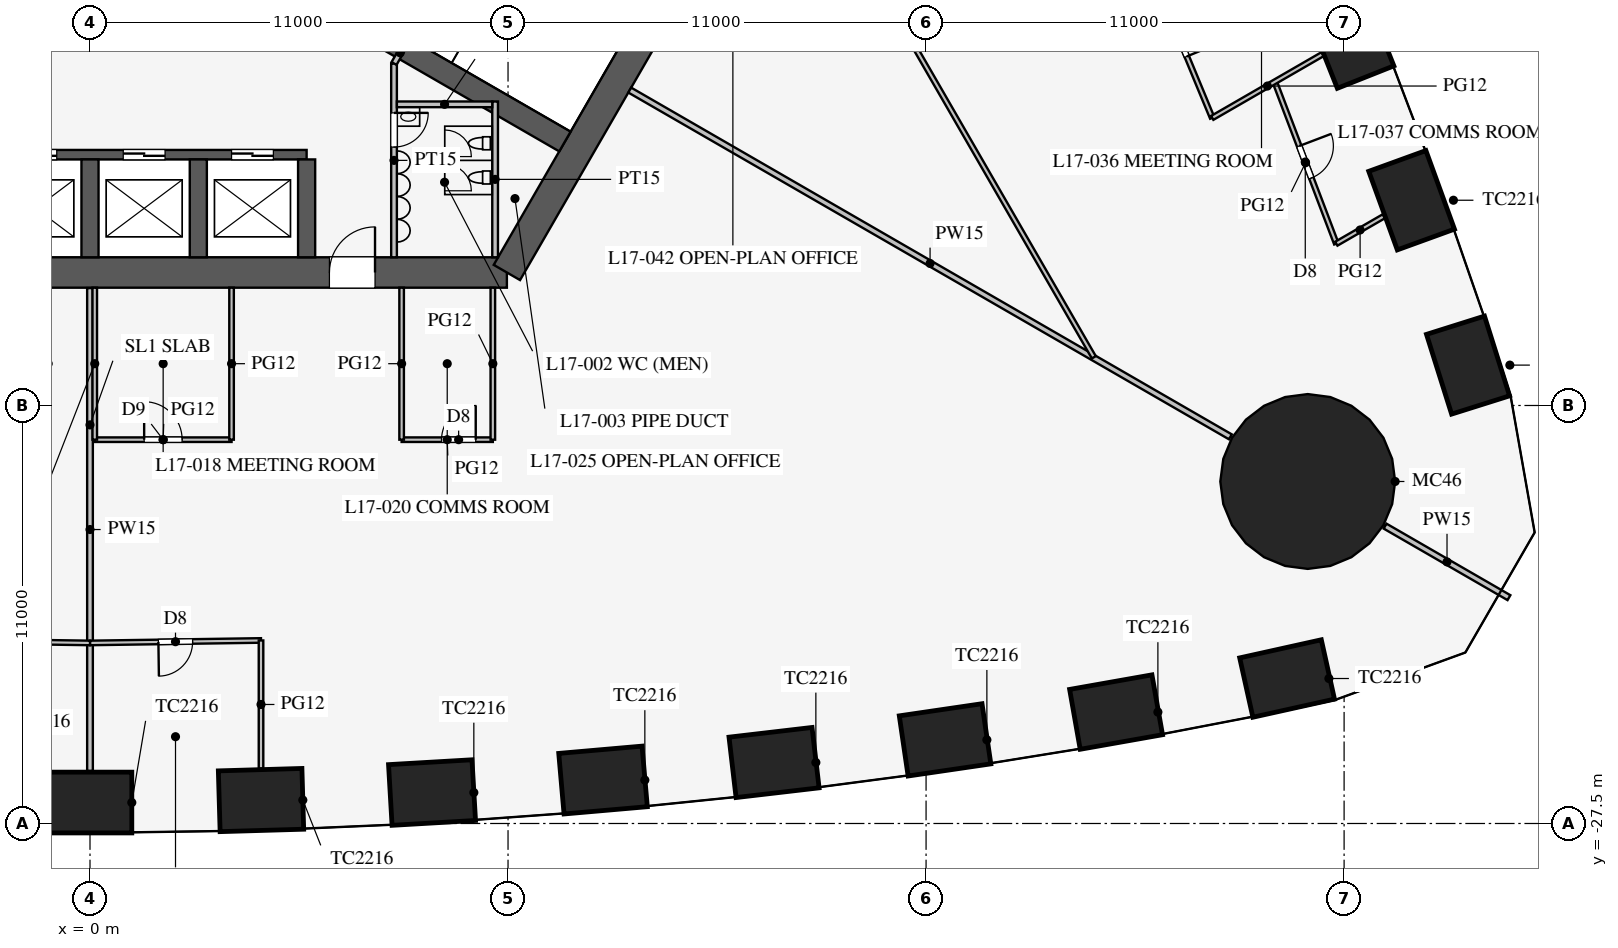
"""IFC4 building model, lengths in metres.
Left out: names, types, materials, properties, quantities, classifications, styles, units other than length and angle.
Written with IfcOpenShell. Run it as: python <this file> out.ifc"""

import sys

from ifc_helpers import new_model, si_unit, direction, frame, frame_2d, origin, origin_2d, place, context, subcontext, project, spatial, rectangle, circle, extrude, element, fill, save


model = new_model("IFC4")
c1 = context("Model", 3, precision=1e-05, world=origin(), true_north=direction((0.0, 1.0)))
c2 = subcontext(c1, "Body", "Model", "MODEL_VIEW")
j1 = project(units=[si_unit("LENGTHUNIT", "METRE"), si_unit("PLANEANGLEUNIT", "RADIAN")], contexts=[c1])
p1 = place(None, origin())
s1 = spatial("IfcSite", under=j1, at=p1, CompositionType="ELEMENT")
p2 = place(p1, origin())
s2 = spatial("IfcBuilding", under=s1, at=p2, CompositionType="ELEMENT")
p3 = place(p2, frame((0.0, 0.0, 75.3)))
s3 = spatial("IfcBuildingStorey", under=s2, at=p3, CompositionType="ELEMENT", Elevation=75.3)
for number, where, z_axis, x_axis in (
    (1, (0.0, -26.949, 0.0), (0.0, 0.0, 1.0), (1.0, 0.0, 0.0)),
    (2, (4.5, -26.883, 0.0), (0.0, 0.0, 1.0), (1.0, 0.029, 0.0)),
    (3, (9.0, -26.686, 0.0), (0.0, 0.0, 1.0), (0.998, 0.058, 0.0)),
    (4, (13.5, -26.357, 0.0), (0.0, 0.0, 1.0), (0.996, 0.087, 0.0)),
    (5, (18.0, -25.895, 0.0), (0.0, 0.0, 1.0), (0.993, 0.116, 0.0)),
    (6, (22.5, -25.299, 0.0), (0.0, 0.0, 1.0), (0.989, 0.145, 0.0)),
    (7, (27.0, -24.568, 0.0), (0.0, 0.0, 1.0), (0.985, 0.174, 0.0)),
    (8, (31.5, -23.685, 0.0), (0.0, 0.0, 1.0), (0.976, 0.217, 0.0)),
    (9, (36.262, -15.438, 0.0), (0.0, 0.0, 1.0), (-0.3, 0.954, 0.0)),
    (10, (34.776, -11.099, 0.0), (0.0, 0.0, 1.0), (-0.342, 0.94, 0.0)),
    (11, (33.16, -6.836, 0.0), (0.0, 0.0, 1.0), (-0.369, 0.929, 0.0)),
):
    element("IfcColumn", number, at=place(p3, frame(where, z_axis=z_axis, x_axis=x_axis)), inside=s3, PredefinedType="COLUMN", context=c2, shape_type="SweptSolid", body=[
        extrude(rectangle(XDim=2.2, YDim=1.6, at=origin_2d()), origin(), (0.0, 0.0, 1.0), 4.2),
    ])
p4 = place(p3, frame((32.043, -18.5, 0.0), z_axis=(0.0, 0.0, 1.0), x_axis=(1.0, 0.0, 0.0)))
e12 = element("IfcColumn", 12, at=p4, inside=s3, PredefinedType="COLUMN", context=c2, shape_type="SweptSolid", body=[
    extrude(circle(Radius=2.3, at=origin_2d()), origin(), (0.0, 0.0, 1.0), 4.2),
])
p5 = place(p3, frame((-10.97, -13.0, 0.0), z_axis=(0.0, 0.0, 1.0), x_axis=(1.0, 0.0, 0.0)))
e13 = element("IfcWall", 13, at=p5, inside=s3, PredefinedType="SHEAR", context=c2, shape_type="SweptSolid", body=[
    extrude(rectangle(XDim=21.939, YDim=0.8, at=frame_2d((10.97, 0.0))), origin(), (0.0, 0.0, 1.0), 4.2),
])
p6 = place(p5, frame((17.27, 0.0, 0.0)))
e14 = element("IfcOpeningElement", 14, at=p6, cuts=e13, PredefinedType="OPENING", context=c2, shape_type="SweptSolid", body=[
    extrude(rectangle(XDim=1.2, YDim=2.1, at=frame_2d((0.6, 1.05))), frame((0.0, 0.41, 0.0), z_axis=(0.0, -1.0, 0.0), x_axis=(1.0, 0.0, 0.0)), (0.0, 0.0, 1.0), 0.82),
])
p7 = place(p5, frame((3.47, 0.0, 0.0)))
e15 = element("IfcOpeningElement", 15, at=p7, cuts=e13, PredefinedType="OPENING", context=c2, shape_type="SweptSolid", body=[
    extrude(rectangle(XDim=1.2, YDim=2.1, at=frame_2d((0.6, 1.05))), frame((0.0, 0.41, 0.0), z_axis=(0.0, -1.0, 0.0), x_axis=(1.0, 0.0, 0.0)), (0.0, 0.0, 1.0), 0.82),
])
p8 = place(p3, frame((10.97, -13.0, 0.0), z_axis=(0.0, 0.0, 1.0), x_axis=(0.499995765644, 0.866027848477, 0.0)))
e16 = element("IfcWall", 16, at=p8, inside=s3, PredefinedType="SHEAR", context=c2, shape_type="SweptSolid", body=[
    extrude(rectangle(XDim=11.547, YDim=0.8, at=frame_2d((5.773, 0.0))), origin(), (0.0, 0.0, 1.0), 4.2),
])
p9 = place(p3, frame((-5.7, -9.9, 0.0), z_axis=(0.0, 0.0, 1.0), x_axis=(1.0, 0.0, 0.0)))
e17 = element("IfcWall", 17, at=p9, inside=s3, PredefinedType="SHEAR", context=c2, shape_type="SweptSolid", body=[
    extrude(rectangle(XDim=11.4, YDim=0.25, at=frame_2d((5.7, 0.0))), origin(), (0.0, 0.0, 1.0), 4.2),
])
p10 = place(p9, frame((0.875, 0.0, 0.0)))
e18 = element("IfcOpeningElement", 18, at=p10, cuts=e17, PredefinedType="OPENING", context=c2, shape_type="SweptSolid", body=[
    extrude(rectangle(XDim=1.1, YDim=2.2, at=frame_2d((0.55, 1.1))), frame((0.0, 0.135, 0.0), z_axis=(0.0, -1.0, 0.0), x_axis=(1.0, 0.0, 0.0)), (0.0, 0.0, 1.0), 0.27),
])
p11 = place(p9, frame((3.725, 0.0, 0.0)))
e19 = element("IfcOpeningElement", 19, at=p11, cuts=e17, PredefinedType="OPENING", context=c2, shape_type="SweptSolid", body=[
    extrude(rectangle(XDim=1.1, YDim=2.2, at=frame_2d((0.55, 1.1))), frame((0.0, 0.135, 0.0), z_axis=(0.0, -1.0, 0.0), x_axis=(1.0, 0.0, 0.0)), (0.0, 0.0, 1.0), 0.27),
])
p12 = place(p9, frame((6.575, 0.0, 0.0)))
e20 = element("IfcOpeningElement", 20, at=p12, cuts=e17, PredefinedType="OPENING", context=c2, shape_type="SweptSolid", body=[
    extrude(rectangle(XDim=1.1, YDim=2.2, at=frame_2d((0.55, 1.1))), frame((0.0, 0.135, 0.0), z_axis=(0.0, -1.0, 0.0), x_axis=(1.0, 0.0, 0.0)), (0.0, 0.0, 1.0), 0.27),
])
p13 = place(p9, frame((9.425, 0.0, 0.0)))
e21 = element("IfcOpeningElement", 21, at=p13, cuts=e17, PredefinedType="OPENING", context=c2, shape_type="SweptSolid", body=[
    extrude(rectangle(XDim=1.1, YDim=2.2, at=frame_2d((0.55, 1.1))), frame((0.0, 0.135, 0.0), z_axis=(0.0, -1.0, 0.0), x_axis=(1.0, 0.0, 0.0)), (0.0, 0.0, 1.0), 0.27),
])
for number, where, z_axis, x_axis in (
    (22, (0.0, -10.025, 0.0), (0.0, 0.0, 1.0), (0.0, -1.0, 0.0)),
    (23, (2.85, -10.025, 0.0), (0.0, 0.0, 1.0), (0.0, -1.0, 0.0)),
    (24, (5.7, -10.025, 0.0), (0.0, 0.0, 1.0), (0.0, -1.0, 0.0)),
):
    element("IfcWall", number, at=place(p3, frame(where, z_axis=z_axis, x_axis=x_axis)), inside=s3, PredefinedType="SHEAR", context=c2, shape_type="SweptSolid", body=[
        extrude(rectangle(XDim=2.575, YDim=0.45, at=frame_2d((1.288, 0.0))), origin(), (0.0, 0.0, 1.0), 4.2),
    ])
p14 = place(p3, frame((4.638, -5.016, 0.0), z_axis=(0.0, 0.0, 1.0), x_axis=(0.866019375473, -0.500010441196, 0.0)))
e25 = element("IfcWall", 25, at=p14, inside=s3, PredefinedType="SHEAR", context=c2, shape_type="SweptSolid", body=[
    extrude(rectangle(XDim=9.075, YDim=0.6, at=frame_2d((4.538, 0.0))), origin(), (0.0, 0.0, 1.0), 4.2),
])
p15 = place(p3, frame((8.0, -7.5, 0.0), z_axis=(0.0, 0.0, 1.0), x_axis=(0.0, -1.0, 0.0)))
e26 = element("IfcWall", 26, at=p15, inside=s3, PredefinedType="PARTITIONING", context=c2, shape_type="SweptSolid", body=[
    extrude(rectangle(XDim=5.1, YDim=0.15, at=frame_2d((2.55, 0.0))), origin(), (0.0, 0.0, 1.0), 4.0),
])
p16 = place(p15, frame((1.3, 0.0, 0.0)))
e27 = element("IfcOpeningElement", 27, at=p16, cuts=e26, PredefinedType="OPENING", context=c2, shape_type="SweptSolid", body=[
    extrude(rectangle(XDim=0.9, YDim=2.1, at=frame_2d((0.45, 1.05))), frame((0.0, 0.085, 0.0), z_axis=(0.0, -1.0, 0.0), x_axis=(1.0, 0.0, 0.0)), (0.0, 0.0, 1.0), 0.17),
])
p17 = place(p3, frame((8.0, -7.5, 0.0), z_axis=(0.0, 0.0, 1.0), x_axis=(0.499842556608, 0.866116284689, 0.0)))
e28 = element("IfcWall", 28, at=p17, inside=s3, PredefinedType="PARTITIONING", context=c2, shape_type="SweptSolid", body=[
    extrude(rectangle(XDim=0.645, YDim=0.15, at=frame_2d((0.323, 0.0))), origin(), (0.0, 0.0, 1.0), 4.0),
])
p18 = place(p3, frame((10.66, -8.5, 0.0), z_axis=(0.0, 0.0, 1.0), x_axis=(0.0, -1.0, 0.0)))
e29 = element("IfcWall", 29, at=p18, inside=s3, PredefinedType="PARTITIONING", context=c2, shape_type="SweptSolid", body=[
    extrude(rectangle(XDim=4.1, YDim=0.15, at=frame_2d((2.05, 0.0))), origin(), (0.0, 0.0, 1.0), 4.0),
])
p19 = place(p3, frame((8.075, -8.575, 0.0), z_axis=(0.0, 0.0, 1.0), x_axis=(1.0, 0.0, 0.0)))
e30 = element("IfcWall", 30, at=p19, inside=s3, PredefinedType="PARTITIONING", context=c2, shape_type="SweptSolid", body=[
    extrude(rectangle(XDim=2.51, YDim=0.15, at=frame_2d((1.255, 0.0))), origin(), (0.0, 0.0, 1.0), 4.0),
])
p20 = place(p3, frame((14.203, -8.2, 0.0), z_axis=(0.0, 0.0, 1.0), x_axis=(0.866024965723, -0.500000758745, 0.0)))
e31 = element("IfcWall", 31, at=p20, inside=s3, PredefinedType="PARTITIONING", context=c2, shape_type="SweptSolid", body=[
    extrude(rectangle(XDim=18.25, YDim=0.15, at=frame_2d((9.125, 0.0))), origin(), (0.0, 0.0, 1.0), 2.3),
])
p21 = place(p3, frame((34.078, -19.675, 0.0), z_axis=(0.0, 0.0, 1.0), x_axis=(0.866019247219, -0.500010663332, 0.0)))
e32 = element("IfcWall", 32, at=p21, inside=s3, PredefinedType="PARTITIONING", context=c2, shape_type="SweptSolid", body=[
    extrude(rectangle(XDim=3.764, YDim=0.15, at=frame_2d((1.882, 0.0))), origin(), (0.0, 0.0, 1.0), 2.3),
])
p22 = place(p3, frame((0.0, -13.41, 0.0), z_axis=(0.0, 0.0, 1.0), x_axis=(0.0, -1.0, 0.0)))
e33 = element("IfcWall", 33, at=p22, inside=s3, PredefinedType="PARTITIONING", context=c2, shape_type="SweptSolid", body=[
    extrude(rectangle(XDim=12.709, YDim=0.15, at=frame_2d((6.354, 0.0))), origin(), (0.0, 0.0, 1.0), 2.8),
])
p23 = place(p3, frame((0.125, -17.4, 0.0), z_axis=(0.0, 0.0, 1.0), x_axis=(1.0, 0.0, 0.0)))
e34 = element("IfcWall", 34, at=p23, inside=s3, PredefinedType="PARTITIONING", context=c2, shape_type="SweptSolid", body=[
    extrude(rectangle(XDim=3.6, YDim=0.12, at=frame_2d((1.8, 0.0))), origin(), (0.0, 0.0, 1.0), 2.9),
])
p24 = place(p23, frame((1.3, 0.0, 0.15)))
e35 = element("IfcOpeningElement", 35, at=p24, cuts=e34, PredefinedType="OPENING", context=c2, shape_type="SweptSolid", body=[
    extrude(rectangle(XDim=1.0, YDim=2.1, at=frame_2d((0.5, 1.05))), frame((0.0, 0.07, 0.0), z_axis=(0.0, -1.0, 0.0), x_axis=(1.0, 0.0, 0.0)), (0.0, 0.0, 1.0), 0.14),
])
p25 = place(p3, frame((8.2, -17.4, 0.0), z_axis=(0.0, 0.0, 1.0), x_axis=(1.0, 0.0, 0.0)))
e36 = element("IfcWall", 36, at=p25, inside=s3, PredefinedType="PARTITIONING", context=c2, shape_type="SweptSolid", body=[
    extrude(rectangle(XDim=2.4, YDim=0.12, at=frame_2d((1.2, 0.0))), origin(), (0.0, 0.0, 1.0), 2.9),
])
p26 = place(p25, frame((1.05, 0.0, 0.15)))
e37 = element("IfcOpeningElement", 37, at=p26, cuts=e36, PredefinedType="OPENING", context=c2, shape_type="SweptSolid", body=[
    extrude(rectangle(XDim=0.9, YDim=2.1, at=frame_2d((0.45, 1.05))), frame((0.0, 0.07, 0.0), z_axis=(0.0, -1.0, 0.0), x_axis=(1.0, 0.0, 0.0)), (0.0, 0.0, 1.0), 0.14),
])
p27 = place(p3, frame((0.125, -13.4, 0.0), z_axis=(0.0, 0.0, 1.0), x_axis=(0.0, -1.0, 0.0)))
e38 = element("IfcWall", 38, at=p27, inside=s3, PredefinedType="PARTITIONING", context=c2, shape_type="SweptSolid", body=[
    extrude(rectangle(XDim=4.0, YDim=0.12, at=frame_2d((2.0, 0.0))), origin(), (0.0, 0.0, 1.0), 2.8),
])
for number, where, z_axis, x_axis in (
    (39, (10.6, -13.4, 0.0), (0.0, 0.0, 1.0), (0.0, -1.0, 0.0)),
    (40, (3.725, -13.4, 0.0), (0.0, 0.0, 1.0), (0.0, -1.0, 0.0)),
    (41, (8.2, -13.4, 0.0), (0.0, 0.0, 1.0), (0.0, -1.0, 0.0)),
):
    element("IfcWall", number, at=place(p3, frame(where, z_axis=z_axis, x_axis=x_axis)), inside=s3, PredefinedType="PARTITIONING", context=c2, shape_type="SweptSolid", body=[
        extrude(rectangle(XDim=4.0, YDim=0.12, at=frame_2d((2.0, 0.0))), origin(), (0.0, 0.0, 1.0), 2.9),
    ])
p28 = place(p3, frame((0.0, -22.749, 0.0), z_axis=(0.0, 0.0, 1.0), x_axis=(0.999894311967, 0.014538393859, 0.0)))
e42 = element("IfcWall", 42, at=p28, inside=s3, PredefinedType="PARTITIONING", context=c2, shape_type="SweptSolid", body=[
    extrude(rectangle(XDim=4.5, YDim=0.12, at=frame_2d((2.25, 0.0))), origin(), (0.0, 0.0, 1.0), 2.9),
])
p29 = place(p28, frame((1.8, 0.0, 0.15)))
e43 = element("IfcOpeningElement", 43, at=p29, cuts=e42, PredefinedType="OPENING", context=c2, shape_type="SweptSolid", body=[
    extrude(rectangle(XDim=0.9, YDim=2.1, at=frame_2d((0.45, 1.05))), frame((0.0, 0.07, 0.0), z_axis=(0.0, -1.0, 0.0), x_axis=(1.0, 0.0, 0.0)), (0.0, 0.0, 1.0), 0.14),
])
p30 = place(p3, frame((-4.5, -22.683, 0.0), z_axis=(0.0, 0.0, 1.0), x_axis=(0.999894311967, -0.014538393859, 0.0)))
e44 = element("IfcWall", 44, at=p30, inside=s3, PredefinedType="PARTITIONING", context=c2, shape_type="SweptSolid", body=[
    extrude(rectangle(XDim=4.5, YDim=0.12, at=frame_2d((2.25, 0.0))), origin(), (0.0, 0.0, 1.0), 2.9),
])
p31 = place(p30, frame((1.8, 0.0, 0.15)))
e45 = element("IfcOpeningElement", 45, at=p31, cuts=e44, PredefinedType="OPENING", context=c2, shape_type="SweptSolid", body=[
    extrude(rectangle(XDim=0.9, YDim=2.1, at=frame_2d((0.45, 1.05))), frame((0.0, 0.07, 0.0), z_axis=(0.0, -1.0, 0.0), x_axis=(1.0, 0.0, 0.0)), (0.0, 0.0, 1.0), 0.14),
])
p32 = place(p3, frame((4.5, -22.683, 0.0), z_axis=(0.0, 0.0, 1.0), x_axis=(0.0, -1.0, 0.0)))
e46 = element("IfcWall", 46, at=p32, inside=s3, PredefinedType="PARTITIONING", context=c2, shape_type="SweptSolid", body=[
    extrude(rectangle(XDim=3.369, YDim=0.12, at=frame_2d((1.685, 0.0))), origin(), (0.0, 0.0, 1.0), 2.8),
])
p33 = place(p3, frame((26.415, -15.231, 0.0), z_axis=(0.0, 0.0, 1.0), x_axis=(-0.50000091641, 0.866024874695, 0.0)))
e47 = element("IfcWall", 47, at=p33, inside=s3, PredefinedType="PARTITIONING", context=c2, shape_type="SweptSolid", body=[
    extrude(rectangle(XDim=52.796, YDim=0.12, at=frame_2d((26.398, 0.0))), origin(), (0.0, 0.0, 1.0), 2.9),
])
p34 = place(p33, frame((10.2, 0.0, 0.15)))
e48 = element("IfcOpeningElement", 48, at=p34, cuts=e47, PredefinedType="OPENING", context=c2, shape_type="SweptSolid", body=[
    extrude(rectangle(XDim=1.8, YDim=2.1, at=frame_2d((0.9, 1.05))), frame((0.0, 0.07, 0.0), z_axis=(0.0, -1.0, 0.0), x_axis=(1.0, 0.0, 0.0)), (0.0, 0.0, 1.0), 0.14),
])
p35 = place(p33, frame((40.8, 0.0, 0.15)))
e49 = element("IfcOpeningElement", 49, at=p35, cuts=e47, PredefinedType="OPENING", context=c2, shape_type="SweptSolid", body=[
    extrude(rectangle(XDim=1.8, YDim=2.1, at=frame_2d((0.9, 1.05))), frame((0.0, 0.07, 0.0), z_axis=(0.0, -1.0, 0.0), x_axis=(1.0, 0.0, 0.0)), (0.0, 0.0, 1.0), 0.14),
])
p36 = place(p3, frame((29.53, -8.932, 0.0), z_axis=(0.0, 0.0, 1.0), x_axis=(-0.382639984525, 0.923897527999, 0.0)))
e50 = element("IfcWall", 50, at=p36, inside=s3, PredefinedType="PARTITIONING", context=c2, shape_type="SweptSolid", body=[
    extrude(rectangle(XDim=4.539, YDim=0.12, at=frame_2d((2.27, 0.0))), origin(), (0.0, 0.0, 1.0), 2.9),
])
p37 = place(p36, frame((1.75, 0.0, 0.15)))
e51 = element("IfcOpeningElement", 51, at=p37, cuts=e50, PredefinedType="OPENING", context=c2, shape_type="SweptSolid", body=[
    extrude(rectangle(XDim=1.0, YDim=2.1, at=frame_2d((0.5, 1.05))), frame((0.0, 0.07, 0.0), z_axis=(0.0, -1.0, 0.0), x_axis=(1.0, 0.0, 0.0)), (0.0, 0.0, 1.0), 0.14),
])
p38 = place(p3, frame((32.795, -12.242, 0.0), z_axis=(0.0, 0.0, 1.0), x_axis=(-0.355369393324, 0.934725946087, 0.0)))
e52 = element("IfcWall", 52, at=p38, inside=s3, PredefinedType="PARTITIONING", context=c2, shape_type="SweptSolid", body=[
    extrude(rectangle(XDim=4.558, YDim=0.12, at=frame_2d((2.279, 0.0))), origin(), (0.0, 0.0, 1.0), 2.9),
])
p39 = place(p38, frame((1.85, 0.0, 0.15)))
e53 = element("IfcOpeningElement", 53, at=p39, cuts=e52, PredefinedType="OPENING", context=c2, shape_type="SweptSolid", body=[
    extrude(rectangle(XDim=0.9, YDim=2.1, at=frame_2d((0.45, 1.05))), frame((0.0, 0.07, 0.0), z_axis=(0.0, -1.0, 0.0), x_axis=(1.0, 0.0, 0.0)), (0.0, 0.0, 1.0), 0.14),
])
p40 = place(p3, frame((29.53, -8.932, 0.0), z_axis=(0.0, 0.0, 1.0), x_axis=(0.866038859646, 0.49997669304, 0.0)))
e54 = element("IfcWall", 54, at=p40, inside=s3, PredefinedType="PARTITIONING", context=c2, shape_type="SweptSolid", body=[
    extrude(rectangle(XDim=3.353, YDim=0.12, at=frame_2d((1.676, 0.0))), origin(), (0.0, 0.0, 1.0), 2.8),
])
p41 = place(p3, frame((32.795, -12.242, 0.0), z_axis=(0.0, 0.0, 1.0), x_axis=(0.866019559589, 0.500010122307, 0.0)))
e55 = element("IfcWall", 55, at=p41, inside=s3, PredefinedType="PARTITIONING", context=c2, shape_type="SweptSolid", body=[
    extrude(rectangle(XDim=1.445, YDim=0.12, at=frame_2d((0.722, 0.0))), origin(), (0.0, 0.0, 1.0), 2.9),
])
p42 = place(p3, frame((-0.016, 30.491, 0.0), z_axis=(0.0, 0.0, 1.0), x_axis=(-0.50000091641, -0.866024874695, 0.0)))
e56 = element("IfcWall", 56, at=p42, inside=s3, PredefinedType="PARTITIONING", context=c2, shape_type="SweptSolid", body=[
    extrude(rectangle(XDim=52.796, YDim=0.12, at=frame_2d((26.398, 0.0))), origin(), (0.0, 0.0, 1.0), 2.9),
])
p43 = place(p42, frame((10.2, 0.0, 0.15)))
e57 = element("IfcOpeningElement", 57, at=p43, cuts=e56, PredefinedType="OPENING", context=c2, shape_type="SweptSolid", body=[
    extrude(rectangle(XDim=1.8, YDim=2.1, at=frame_2d((0.9, 1.05))), frame((0.0, 0.07, 0.0), z_axis=(0.0, -1.0, 0.0), x_axis=(1.0, 0.0, 0.0)), (0.0, 0.0, 1.0), 0.14),
])
p44 = place(p42, frame((40.8, 0.0, 0.15)))
e58 = element("IfcOpeningElement", 58, at=p44, cuts=e56, PredefinedType="OPENING", context=c2, shape_type="SweptSolid", body=[
    extrude(rectangle(XDim=1.8, YDim=2.1, at=frame_2d((0.9, 1.05))), frame((0.0, 0.07, 0.0), z_axis=(0.0, -1.0, 0.0), x_axis=(1.0, 0.0, 0.0)), (0.0, 0.0, 1.0), 0.14),
])
p45 = place(p16, origin())
e59 = element("IfcDoor", 59, at=p45, inside=s3, OperationType="SINGLE_SWING_LEFT", PredefinedType="DOOR", context=c2, shape_type="SweptSolid", body=[
    extrude(rectangle(XDim=0.9, YDim=2.1, at=frame_2d((0.45, 1.05))), frame((0.0, 0.025, 0.0), z_axis=(0.0, -1.0, 0.0), x_axis=(1.0, 0.0, 0.0)), (0.0, 0.0, 1.0), 0.05),
])
fill(e27, e59)
p46 = place(p6, origin())
e60 = element("IfcDoor", 60, at=p46, inside=s3, OperationType="SINGLE_SWING_RIGHT", PredefinedType="DOOR", context=c2, shape_type="SweptSolid", body=[
    extrude(rectangle(XDim=1.2, YDim=2.1, at=frame_2d((0.6, 1.05))), frame((0.0, 0.025, 0.0), z_axis=(0.0, -1.0, 0.0), x_axis=(1.0, 0.0, 0.0)), (0.0, 0.0, 1.0), 0.05),
])
fill(e14, e60)
p47 = place(p24, origin())
e61 = element("IfcDoor", 61, at=p47, inside=s3, OperationType="SINGLE_SWING_LEFT", PredefinedType="DOOR", context=c2, shape_type="SweptSolid", body=[
    extrude(rectangle(XDim=1.0, YDim=2.1, at=frame_2d((0.5, 1.05))), frame((0.0, 0.025, 0.0), z_axis=(0.0, -1.0, 0.0), x_axis=(1.0, 0.0, 0.0)), (0.0, 0.0, 1.0), 0.05),
])
fill(e35, e61)
p48 = place(p26, origin())
e62 = element("IfcDoor", 62, at=p48, inside=s3, OperationType="SINGLE_SWING_RIGHT", PredefinedType="DOOR", context=c2, shape_type="SweptSolid", body=[
    extrude(rectangle(XDim=0.9, YDim=2.1, at=frame_2d((0.45, 1.05))), frame((0.0, 0.025, 0.0), z_axis=(0.0, -1.0, 0.0), x_axis=(1.0, 0.0, 0.0)), (0.0, 0.0, 1.0), 0.05),
])
fill(e37, e62)
p49 = place(p29, frame((0.9, 0.0, 0.0), z_axis=(0.0, 0.0, 1.0), x_axis=(-1.0, 0.0, 0.0)))
e63 = element("IfcDoor", 63, at=p49, inside=s3, OperationType="SINGLE_SWING_RIGHT", PredefinedType="DOOR", context=c2, shape_type="SweptSolid", body=[
    extrude(rectangle(XDim=0.9, YDim=2.1, at=frame_2d((0.45, 1.05))), frame((0.0, 0.025, 0.0), z_axis=(0.0, -1.0, 0.0), x_axis=(1.0, 0.0, 0.0)), (0.0, 0.0, 1.0), 0.05),
])
fill(e43, e63)
p50 = place(p37, frame((1.0, 0.0, 0.0), z_axis=(0.0, 0.0, 1.0), x_axis=(-1.0, 0.0, 0.0)))
e64 = element("IfcDoor", 64, at=p50, inside=s3, OperationType="SINGLE_SWING_RIGHT", PredefinedType="DOOR", context=c2, shape_type="SweptSolid", body=[
    extrude(rectangle(XDim=1.0, YDim=2.1, at=frame_2d((0.5, 1.05))), frame((0.0, 0.025, 0.0), z_axis=(0.0, -1.0, 0.0), x_axis=(1.0, 0.0, 0.0)), (0.0, 0.0, 1.0), 0.05),
])
fill(e51, e64)
p51 = place(p39, frame((0.9, 0.0, 0.0), z_axis=(0.0, 0.0, 1.0), x_axis=(-1.0, 0.0, 0.0)))
e65 = element("IfcDoor", 65, at=p51, inside=s3, OperationType="SINGLE_SWING_LEFT", PredefinedType="DOOR", context=c2, shape_type="SweptSolid", body=[
    extrude(rectangle(XDim=0.9, YDim=2.1, at=frame_2d((0.45, 1.05))), frame((0.0, 0.025, 0.0), z_axis=(0.0, -1.0, 0.0), x_axis=(1.0, 0.0, 0.0)), (0.0, 0.0, 1.0), 0.05),
])
fill(e53, e65)
p52 = place(p11, origin())
e66 = element("IfcDoor", 66, at=p52, inside=s3, OperationType="DOUBLE_DOOR_SLIDING", PredefinedType="DOOR", context=c2, shape_type="SweptSolid", body=[
    extrude(rectangle(XDim=1.1, YDim=2.2, at=frame_2d((0.55, 1.1))), frame((0.0, 0.025, 0.0), z_axis=(0.0, -1.0, 0.0), x_axis=(1.0, 0.0, 0.0)), (0.0, 0.0, 1.0), 0.05),
])
fill(e19, e66)
p53 = place(p12, origin())
e67 = element("IfcDoor", 67, at=p53, inside=s3, OperationType="DOUBLE_DOOR_SLIDING", PredefinedType="DOOR", context=c2, shape_type="SweptSolid", body=[
    extrude(rectangle(XDim=1.1, YDim=2.2, at=frame_2d((0.55, 1.1))), frame((0.0, 0.025, 0.0), z_axis=(0.0, -1.0, 0.0), x_axis=(1.0, 0.0, 0.0)), (0.0, 0.0, 1.0), 0.05),
])
fill(e20, e67)
p54 = place(p13, origin())
e68 = element("IfcDoor", 68, at=p54, inside=s3, OperationType="DOUBLE_DOOR_SLIDING", PredefinedType="DOOR", context=c2, shape_type="SweptSolid", body=[
    extrude(rectangle(XDim=1.1, YDim=2.2, at=frame_2d((0.55, 1.1))), frame((0.0, 0.025, 0.0), z_axis=(0.0, -1.0, 0.0), x_axis=(1.0, 0.0, 0.0)), (0.0, 0.0, 1.0), 0.05),
])
fill(e21, e68)
save(model, sys.argv[1])
